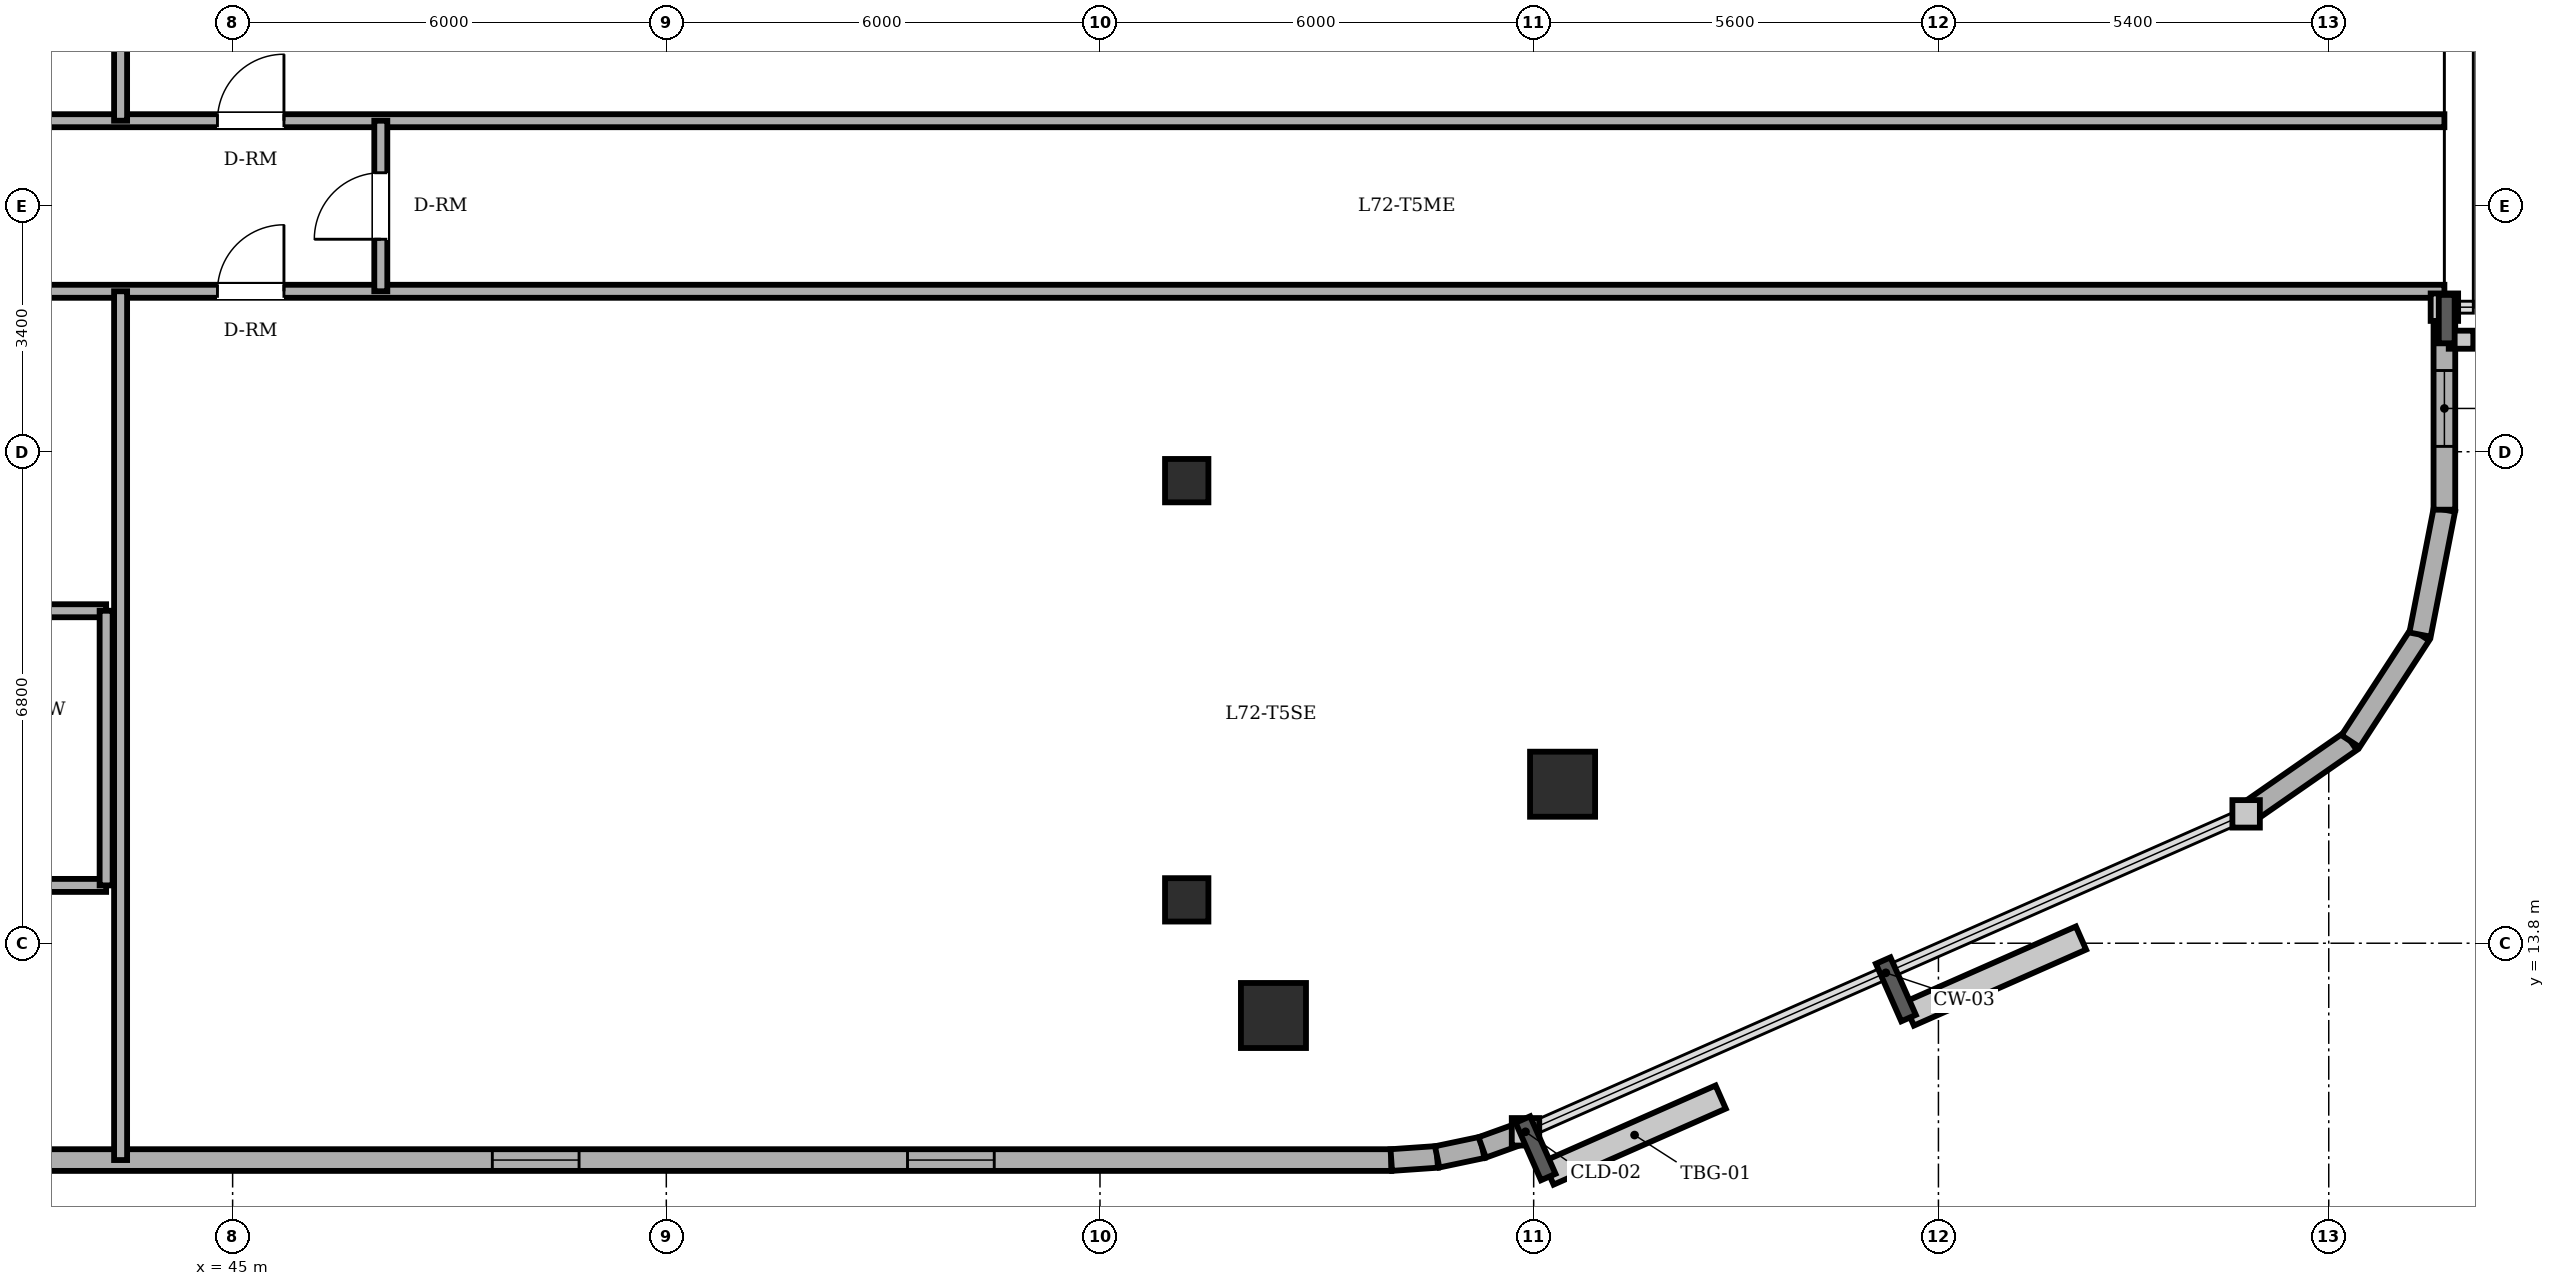
"""IFC4 building model, lengths in metres.
Left out: names, types, materials, properties, quantities, classifications, styles, units other than length and angle.
Written with IfcOpenShell. Run it as: python <this file> out.ifc"""

import sys

from ifc_helpers import new_model, si_unit, direction, frame, frame_2d, origin, origin_2d, place, context, subcontext, project, spatial, rectangle, circle, extrude, element, fill, save


model = new_model("IFC4")
c1 = context("Model", 3, precision=1e-05, world=origin(), true_north=direction((0.0, 1.0)))
c2 = subcontext(c1, "Body", "Model", "MODEL_VIEW")
j1 = project(units=[si_unit("LENGTHUNIT", "METRE"), si_unit("PLANEANGLEUNIT", "RADIAN")], contexts=[c1])
p1 = place(None, origin())
s1 = spatial("IfcSite", under=j1, at=p1, CompositionType="ELEMENT")
p2 = place(p1, origin())
s2 = spatial("IfcBuilding", under=s1, at=p2, CompositionType="ELEMENT")
p3 = place(p2, frame((0.0, 0.0, 277.05)))
s3 = spatial("IfcBuildingStorey", under=s2, at=p3, CompositionType="ELEMENT", Elevation=277.05)
for number, where, z_axis, x_axis in (
    (1, (59.4, 12.8, 0.0), (0.0, 0.0, 1.0), (1.0, 0.0, 0.0)),
    (2, (63.4, 16.0, 0.0), (0.0, 0.0, 1.0), (1.0, 0.0, 0.0)),
):
    element("IfcColumn", number, at=place(p3, frame(where, z_axis=z_axis, x_axis=x_axis)), inside=s3, PredefinedType="COLUMN", context=c2, shape_type="SweptSolid", body=[
        extrude(circle(Radius=0.45, at=origin_2d()), origin(), (0.0, 0.0, 1.0), 3.65),
    ])
for number, where, z_axis, x_axis in (
    (3, (58.2, 14.4, 0.0), (0.0, 0.0, 1.0), (1.0, 0.0, 0.0)),
    (4, (58.2, 20.2, 0.0), (0.0, 0.0, 1.0), (1.0, 0.0, 0.0)),
):
    element("IfcColumn", number, at=place(p3, frame(where, z_axis=z_axis, x_axis=x_axis)), inside=s3, PredefinedType="COLUMN", context=c2, shape_type="SweptSolid", body=[
        extrude(rectangle(XDim=0.6, YDim=0.6, at=origin_2d()), origin(), (0.0, 0.0, 1.0), 3.65),
    ])
p4 = place(p3, frame((24.0, 10.8, 0.0), z_axis=(0.0, 0.0, 1.0), x_axis=(1.0, 0.0, 0.0)))
e5 = element("IfcWall", 5, at=p4, inside=s3, PredefinedType="SOLIDWALL", context=c2, shape_type="SweptSolid", body=[
    extrude(rectangle(XDim=37.03, YDim=0.3, at=frame_2d((18.515, 0.0))), origin(), (0.0, 0.0, 1.0), 3.45),
])
p5 = place(p4, frame((12.325, 0.0, 0.0)))
e6 = element("IfcOpeningElement", 6, at=p5, cuts=e5, PredefinedType="OPENING", context=c2, shape_type="SweptSolid", body=[
    extrude(rectangle(XDim=0.95, YDim=2.2, at=frame_2d((0.475, 1.1))), frame((0.0, 0.16, 0.0), z_axis=(0.0, -1.0, 0.0), x_axis=(1.0, 0.0, 0.0)), (0.0, 0.0, 1.0), 0.32),
])
p6 = place(p4, frame((4.917, 0.0, 0.85)))
e7 = element("IfcOpeningElement", 7, at=p6, cuts=e5, PredefinedType="OPENING", context=c2, shape_type="SweptSolid", body=[
    extrude(rectangle(XDim=1.2, YDim=1.6, at=frame_2d((0.6, 0.8))), frame((0.0, 0.16, 0.0), z_axis=(0.0, -1.0, 0.0), x_axis=(1.0, 0.0, 0.0)), (0.0, 0.0, 1.0), 0.32),
])
p7 = place(p4, frame((10.083, 0.0, 0.85)))
e8 = element("IfcOpeningElement", 8, at=p7, cuts=e5, PredefinedType="OPENING", context=c2, shape_type="SweptSolid", body=[
    extrude(rectangle(XDim=1.2, YDim=1.6, at=frame_2d((0.6, 0.8))), frame((0.0, 0.16, 0.0), z_axis=(0.0, -1.0, 0.0), x_axis=(1.0, 0.0, 0.0)), (0.0, 0.0, 1.0), 0.32),
])
p8 = place(p4, frame((17.05, 0.0, 0.85)))
e9 = element("IfcOpeningElement", 9, at=p8, cuts=e5, PredefinedType="OPENING", context=c2, shape_type="SweptSolid", body=[
    extrude(rectangle(XDim=1.2, YDim=1.6, at=frame_2d((0.6, 0.8))), frame((0.0, 0.16, 0.0), z_axis=(0.0, -1.0, 0.0), x_axis=(1.0, 0.0, 0.0)), (0.0, 0.0, 1.0), 0.32),
])
p9 = place(p4, frame((24.593, 0.0, 0.85)))
e10 = element("IfcOpeningElement", 10, at=p9, cuts=e5, PredefinedType="OPENING", context=c2, shape_type="SweptSolid", body=[
    extrude(rectangle(XDim=1.2, YDim=1.6, at=frame_2d((0.6, 0.8))), frame((0.0, 0.16, 0.0), z_axis=(0.0, -1.0, 0.0), x_axis=(1.0, 0.0, 0.0)), (0.0, 0.0, 1.0), 0.32),
])
p10 = place(p4, frame((30.337, 0.0, 0.85)))
e11 = element("IfcOpeningElement", 11, at=p10, cuts=e5, PredefinedType="OPENING", context=c2, shape_type="SweptSolid", body=[
    extrude(rectangle(XDim=1.2, YDim=1.6, at=frame_2d((0.6, 0.8))), frame((0.0, 0.16, 0.0), z_axis=(0.0, -1.0, 0.0), x_axis=(1.0, 0.0, 0.0)), (0.0, 0.0, 1.0), 0.32),
])
p11 = place(p3, frame((61.03, 10.8, 0.0), z_axis=(0.0, 0.0, 1.0), x_axis=(0.997613959688, 0.069039028352, 0.0)))
e12 = element("IfcWall", 12, at=p11, inside=s3, PredefinedType="SOLIDWALL", context=c2, shape_type="SweptSolid", body=[
    extrude(rectangle(XDim=0.636, YDim=0.3, at=frame_2d((0.318, 0.0))), origin(), (0.0, 0.0, 1.0), 3.45),
])
p12 = place(p3, frame((61.665, 10.844, 0.0), z_axis=(0.0, 0.0, 1.0), x_axis=(0.97857012251, 0.205913854149, 0.0)))
e13 = element("IfcWall", 13, at=p12, inside=s3, PredefinedType="SOLIDWALL", context=c2, shape_type="SweptSolid", body=[
    extrude(rectangle(XDim=0.637, YDim=0.3, at=frame_2d((0.318, 0.0))), origin(), (0.0, 0.0, 1.0), 3.45),
])
p13 = place(p3, frame((62.288, 10.975, 0.0), z_axis=(0.0, 0.0, 1.0), x_axis=(0.94077491148, 0.339031806665, 0.0)))
e14 = element("IfcWall", 14, at=p13, inside=s3, PredefinedType="SOLIDWALL", context=c2, shape_type="SweptSolid", body=[
    extrude(rectangle(XDim=0.636, YDim=0.3, at=frame_2d((0.318, 0.0))), origin(), (0.0, 0.0, 1.0), 3.45),
])
p14 = place(p3, frame((72.857, 15.59, 0.0), z_axis=(0.0, 0.0, 1.0), x_axis=(0.821006966142, 0.570918174124, 0.0)))
e15 = element("IfcWall", 15, at=p14, inside=s3, PredefinedType="SOLIDWALL", context=c2, shape_type="SweptSolid", body=[
    extrude(rectangle(XDim=1.76, YDim=0.3, at=frame_2d((0.88, 0.0))), origin(), (0.0, 0.0, 1.0), 3.45),
])
for number, where, z_axis, x_axis in (
    (16, (74.302, 16.595, 0.0), (0.0, 0.0, 1.0), (0.546, 0.838, 0.0)),
    (17, (75.263, 18.07, 0.0), (0.0, 0.0, 1.0), (0.192, 0.981, 0.0)),
):
    element("IfcWall", number, at=place(p3, frame(where, z_axis=z_axis, x_axis=x_axis)), inside=s3, PredefinedType="SOLIDWALL", context=c2, shape_type="SweptSolid", body=[
        extrude(rectangle(XDim=1.76, YDim=0.3, at=frame_2d((0.88, 0.0))), origin(), (0.0, 0.0, 1.0), 3.45),
    ])
p15 = place(p3, frame((75.6, 19.798, 0.0), z_axis=(0.0, 0.0, 1.0), x_axis=(0.0, 1.0, 0.0)))
e18 = element("IfcWall", 18, at=p15, inside=s3, PredefinedType="SOLIDWALL", context=c2, shape_type="SweptSolid", body=[
    extrude(rectangle(XDim=2.802, YDim=0.3, at=frame_2d((1.401, 0.0))), origin(), (0.0, 0.0, 1.0), 3.45),
])
p16 = place(p15, frame((0.876, 0.0, 0.85)))
e19 = element("IfcOpeningElement", 19, at=p16, cuts=e18, PredefinedType="OPENING", context=c2, shape_type="SweptSolid", body=[
    extrude(rectangle(XDim=1.05, YDim=1.55, at=frame_2d((0.525, 0.775))), frame((0.0, 0.16, 0.0), z_axis=(0.0, -1.0, 0.0), x_axis=(1.0, 0.0, 0.0)), (0.0, 0.0, 1.0), 0.32),
])
p17 = place(p3, frame((39.85, 14.6, 0.0), z_axis=(0.0, 0.0, 1.0), x_axis=(1.0, 0.0, 0.0)))
e20 = element("IfcWall", 20, at=p17, inside=s3, PredefinedType="PARTITIONING", context=c2, shape_type="SweptSolid", body=[
    extrude(rectangle(XDim=3.4, YDim=0.18, at=frame_2d((1.7, 0.0))), origin(), (0.0, 0.0, 1.0), 3.092),
])
p18 = place(p3, frame((39.85, 18.4, 0.0), z_axis=(0.0, 0.0, 1.0), x_axis=(1.0, 0.0, 0.0)))
e21 = element("IfcWall", 21, at=p18, inside=s3, PredefinedType="PARTITIONING", context=c2, shape_type="SweptSolid", body=[
    extrude(rectangle(XDim=3.4, YDim=0.18, at=frame_2d((1.7, 0.0))), origin(), (0.0, 0.0, 1.0), 3.132),
])
p19 = place(p3, frame((39.85, 22.82, 0.0), z_axis=(0.0, 0.0, 1.0), x_axis=(1.0, 0.0, 0.0)))
e22 = element("IfcWall", 22, at=p19, inside=s3, PredefinedType="PARTITIONING", context=c2, shape_type="SweptSolid", body=[
    extrude(rectangle(XDim=35.75, YDim=0.18, at=frame_2d((17.875, 0.0))), origin(), (0.0, 0.0, 1.0), 3.45),
])
p20 = place(p19, frame((4.94, 0.0, 0.0)))
e23 = element("IfcOpeningElement", 23, at=p20, cuts=e22, PredefinedType="OPENING", context=c2, shape_type="SweptSolid", body=[
    extrude(rectangle(XDim=0.92, YDim=2.1, at=frame_2d((0.46, 1.05))), frame((0.0, 0.1, 0.0), z_axis=(0.0, -1.0, 0.0), x_axis=(1.0, 0.0, 0.0)), (0.0, 0.0, 1.0), 0.2),
])
p21 = place(p3, frame((39.85, 25.18, 0.0), z_axis=(0.0, 0.0, 1.0), x_axis=(1.0, 0.0, 0.0)))
e24 = element("IfcWall", 24, at=p21, inside=s3, PredefinedType="PARTITIONING", context=c2, shape_type="SweptSolid", body=[
    extrude(rectangle(XDim=35.75, YDim=0.18, at=frame_2d((17.875, 0.0))), origin(), (0.0, 0.0, 1.0), 3.45),
])
p22 = place(p21, frame((4.94, 0.0, 0.0)))
e25 = element("IfcOpeningElement", 25, at=p22, cuts=e24, PredefinedType="OPENING", context=c2, shape_type="SweptSolid", body=[
    extrude(rectangle(XDim=0.92, YDim=2.1, at=frame_2d((0.46, 1.05))), frame((0.0, 0.1, 0.0), z_axis=(0.0, -1.0, 0.0), x_axis=(1.0, 0.0, 0.0)), (0.0, 0.0, 1.0), 0.2),
])
p23 = place(p3, frame((43.25, 14.6, 0.0), z_axis=(0.0, 0.0, 1.0), x_axis=(0.0, 1.0, 0.0)))
e26 = element("IfcWall", 26, at=p23, inside=s3, PredefinedType="PARTITIONING", context=c2, shape_type="SweptSolid", body=[
    extrude(rectangle(XDim=3.8, YDim=0.18, at=frame_2d((1.9, 0.0))), origin(), (0.0, 0.0, 1.0), 3.45),
])
p24 = place(p3, frame((43.45, 10.8, 0.0), z_axis=(0.0, 0.0, 1.0), x_axis=(0.0, 1.0, 0.0)))
e27 = element("IfcWall", 27, at=p24, inside=s3, PredefinedType="PARTITIONING", context=c2, shape_type="SweptSolid", body=[
    extrude(rectangle(XDim=12.02, YDim=0.18, at=frame_2d((6.01, 0.0))), origin(), (0.0, 0.0, 1.0), 3.45),
])
p25 = place(p3, frame((43.45, 25.18, 0.0), z_axis=(0.0, 0.0, 1.0), x_axis=(0.0, 1.0, 0.0)))
e28 = element("IfcWall", 28, at=p25, inside=s3, PredefinedType="PARTITIONING", context=c2, shape_type="SweptSolid", body=[
    extrude(rectangle(XDim=4.42, YDim=0.18, at=frame_2d((2.21, 0.0))), origin(), (0.0, 0.0, 1.0), 3.45),
])
p26 = place(p3, frame((47.05, 22.82, 0.0), z_axis=(0.0, 0.0, 1.0), x_axis=(0.0, 1.0, 0.0)))
e29 = element("IfcWall", 29, at=p26, inside=s3, PredefinedType="PARTITIONING", context=c2, shape_type="SweptSolid", body=[
    extrude(rectangle(XDim=2.36, YDim=0.18, at=frame_2d((1.18, 0.0))), origin(), (0.0, 0.0, 1.0), 3.45),
])
p27 = place(p26, frame((0.72, 0.0, 0.0)))
e30 = element("IfcOpeningElement", 30, at=p27, cuts=e29, PredefinedType="OPENING", context=c2, shape_type="SweptSolid", body=[
    extrude(rectangle(XDim=0.92, YDim=2.1, at=frame_2d((0.46, 1.05))), frame((0.0, 0.1, 0.0), z_axis=(0.0, -1.0, 0.0), x_axis=(1.0, 0.0, 0.0)), (0.0, 0.0, 1.0), 0.2),
])
p28 = place(p9, origin())
e31 = element("IfcWindow", 31, at=p28, inside=s3, PartitioningType="SINGLE_PANEL", PredefinedType="WINDOW", context=c2, shape_type="SweptSolid", body=[
    extrude(rectangle(XDim=1.2, YDim=1.6, at=frame_2d((0.6, 0.8))), frame((0.0, 0.03, 0.0), z_axis=(0.0, -1.0, 0.0), x_axis=(1.0, 0.0, 0.0)), (0.0, 0.0, 1.0), 0.06),
])
fill(e10, e31)
p29 = place(p10, origin())
e32 = element("IfcWindow", 32, at=p29, inside=s3, PartitioningType="SINGLE_PANEL", PredefinedType="WINDOW", context=c2, shape_type="SweptSolid", body=[
    extrude(rectangle(XDim=1.2, YDim=1.6, at=frame_2d((0.6, 0.8))), frame((0.0, 0.03, 0.0), z_axis=(0.0, -1.0, 0.0), x_axis=(1.0, 0.0, 0.0)), (0.0, 0.0, 1.0), 0.06),
])
fill(e11, e32)
p30 = place(p16, origin())
e33 = element("IfcWindow", 33, at=p30, inside=s3, PartitioningType="SINGLE_PANEL", PredefinedType="WINDOW", context=c2, shape_type="SweptSolid", body=[
    extrude(rectangle(XDim=1.05, YDim=1.55, at=frame_2d((0.525, 0.775))), frame((0.0, 0.03, 0.0), z_axis=(0.0, -1.0, 0.0), x_axis=(1.0, 0.0, 0.0)), (0.0, 0.0, 1.0), 0.06),
])
fill(e19, e33)
p31 = place(p22, origin())
e34 = element("IfcDoor", 34, at=p31, inside=s3, OperationType="SINGLE_SWING_RIGHT", PredefinedType="DOOR", context=c2, shape_type="SweptSolid", body=[
    extrude(rectangle(XDim=0.92, YDim=2.1, at=frame_2d((0.46, 1.05))), frame((0.0, 0.025, 0.0), z_axis=(0.0, -1.0, 0.0), x_axis=(1.0, 0.0, 0.0)), (0.0, 0.0, 1.0), 0.05),
])
fill(e25, e34)
p32 = place(p27, origin())
e35 = element("IfcDoor", 35, at=p32, inside=s3, OperationType="SINGLE_SWING_LEFT", PredefinedType="DOOR", context=c2, shape_type="SweptSolid", body=[
    extrude(rectangle(XDim=0.92, YDim=2.1, at=frame_2d((0.46, 1.05))), frame((0.0, 0.025, 0.0), z_axis=(0.0, -1.0, 0.0), x_axis=(1.0, 0.0, 0.0)), (0.0, 0.0, 1.0), 0.05),
])
fill(e30, e35)
p33 = place(p20, origin())
e36 = element("IfcDoor", 36, at=p33, inside=s3, OperationType="SINGLE_SWING_RIGHT", PredefinedType="DOOR", context=c2, shape_type="SweptSolid", body=[
    extrude(rectangle(XDim=0.92, YDim=2.1, at=frame_2d((0.46, 1.05))), frame((0.0, 0.025, 0.0), z_axis=(0.0, -1.0, 0.0), x_axis=(1.0, 0.0, 0.0)), (0.0, 0.0, 1.0), 0.05),
])
fill(e23, e36)
save(model, sys.argv[1])
